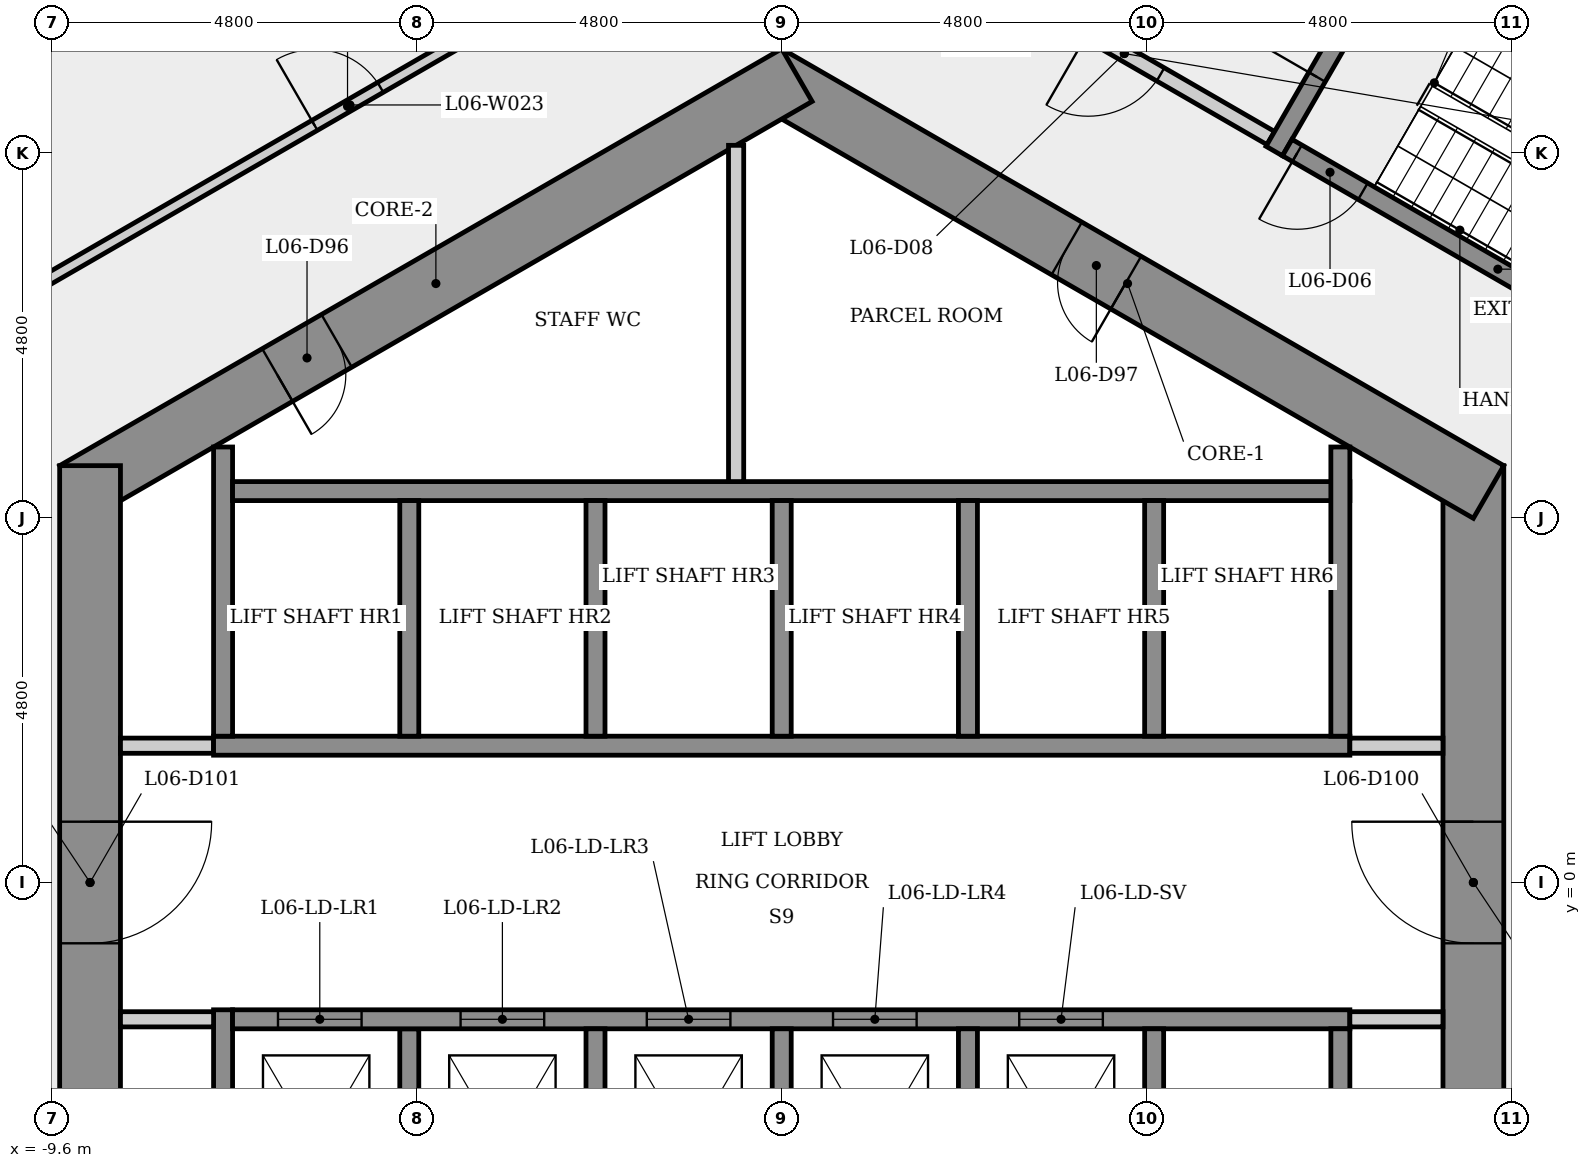
"""IFC4 building model, lengths in metres.
Left out: names, types, materials, properties, quantities, classifications, styles, units other than length and angle.
Written with IfcOpenShell. Run it as: python <this file> out.ifc"""

import sys

from ifc_helpers import new_model, si_unit, direction, frame, frame_2d, origin, place, context, subcontext, project, spatial, rectangle, extrude, element, fill, save


model = new_model("IFC4")
c1 = context("Model", 3, precision=1e-05, world=origin(), true_north=direction((0.0, 1.0)))
c2 = subcontext(c1, "Body", "Model", "MODEL_VIEW")
j1 = project(units=[si_unit("LENGTHUNIT", "METRE"), si_unit("PLANEANGLEUNIT", "RADIAN")], contexts=[c1])
p1 = place(None, origin())
s1 = spatial("IfcSite", under=j1, at=p1, CompositionType="ELEMENT")
p2 = place(p1, origin())
s2 = spatial("IfcBuilding", under=s1, at=p2, CompositionType="ELEMENT")
p3 = place(p2, frame((0.0, 0.0, 28.9)))
s3 = spatial("IfcBuildingStorey", under=s2, at=p3, CompositionType="ELEMENT", Elevation=28.9)
p4 = place(p3, frame((9.1, -5.485, 0.0), z_axis=(0.0, 0.0, 1.0), x_axis=(0.0, 1.0, 0.0)))
e1 = element("IfcWall", 1, at=p4, inside=s3, PredefinedType="SHEAR", context=c2, shape_type="SweptSolid", body=[
    extrude(rectangle(XDim=10.97, YDim=0.8, at=frame_2d((5.485, 0.0))), origin(), (0.0, 0.0, 1.0), 3.4),
])
p5 = place(p4, frame((4.685, 0.0, 0.0)))
e2 = element("IfcOpeningElement", 2, at=p5, cuts=e1, PredefinedType="OPENING", context=c2, shape_type="SweptSolid", body=[
    extrude(rectangle(XDim=1.6, YDim=2.1, at=frame_2d((0.8, 1.05))), frame((0.0, 0.41, 0.0), z_axis=(0.0, -1.0, 0.0), x_axis=(1.0, 0.0, 0.0)), (0.0, 0.0, 1.0), 0.82),
])
p6 = place(p3, frame((9.3, 5.138, 0.0), z_axis=(0.0, 0.0, 1.0), x_axis=(-0.866023993627, 0.500002442456, 0.0)))
e3 = element("IfcWall", 3, at=p6, inside=s3, PredefinedType="SHEAR", context=c2, shape_type="SweptSolid", body=[
    extrude(rectangle(XDim=10.97, YDim=0.8, at=frame_2d((5.485, 0.0))), origin(), (0.0, 0.0, 1.0), 3.4),
])
p7 = place(p6, frame((5.509, 0.0, 0.0)))
e4 = element("IfcOpeningElement", 4, at=p7, cuts=e3, PredefinedType="OPENING", context=c2, shape_type="SweptSolid", body=[
    extrude(rectangle(XDim=0.9, YDim=2.1, at=frame_2d((0.45, 1.05))), frame((0.0, 0.41, 0.0), z_axis=(0.0, -1.0, 0.0), x_axis=(1.0, 0.0, 0.0)), (0.0, 0.0, 1.0), 0.82),
])
p8 = place(p3, frame((0.2, 10.623, 0.0), z_axis=(0.0, 0.0, 1.0), x_axis=(-0.866023993627, -0.500002442456, 0.0)))
e5 = element("IfcWall", 5, at=p8, inside=s3, PredefinedType="SHEAR", context=c2, shape_type="SweptSolid", body=[
    extrude(rectangle(XDim=10.97, YDim=0.8, at=frame_2d((5.485, 0.0))), origin(), (0.0, 0.0, 1.0), 3.4),
])
p9 = place(p8, frame((6.993, 0.0, 0.0)))
e6 = element("IfcOpeningElement", 6, at=p9, cuts=e5, PredefinedType="OPENING", context=c2, shape_type="SweptSolid", body=[
    extrude(rectangle(XDim=0.9, YDim=2.1, at=frame_2d((0.45, 1.05))), frame((0.0, 0.41, 0.0), z_axis=(0.0, -1.0, 0.0), x_axis=(1.0, 0.0, 0.0)), (0.0, 0.0, 1.0), 0.82),
])
p10 = place(p3, frame((-9.1, 5.485, 0.0), z_axis=(0.0, 0.0, 1.0), x_axis=(0.0, -1.0, 0.0)))
e7 = element("IfcWall", 7, at=p10, inside=s3, PredefinedType="SHEAR", context=c2, shape_type="SweptSolid", body=[
    extrude(rectangle(XDim=10.97, YDim=0.8, at=frame_2d((5.485, 0.0))), origin(), (0.0, 0.0, 1.0), 3.4),
])
p11 = place(p10, frame((4.685, 0.0, 0.0)))
e8 = element("IfcOpeningElement", 8, at=p11, cuts=e7, PredefinedType="OPENING", context=c2, shape_type="SweptSolid", body=[
    extrude(rectangle(XDim=1.6, YDim=2.1, at=frame_2d((0.8, 1.05))), frame((0.0, 0.41, 0.0), z_axis=(0.0, -1.0, 0.0), x_axis=(1.0, 0.0, 0.0)), (0.0, 0.0, 1.0), 0.82),
])
p12 = place(p3, frame((-10.825, 7.26, 0.0), z_axis=(0.0, 0.0, 1.0), x_axis=(0.866026819738, 0.499997547488, 0.0)))
e9 = element("IfcWall", 9, at=p12, inside=s3, PredefinedType="PARTITIONING", context=c2, shape_type="SweptSolid", body=[
    extrude(rectangle(XDim=11.882, YDim=0.15, at=frame_2d((5.941, 0.0))), origin(), (0.0, 0.0, 1.0), 3.05),
])
p13 = place(p12, frame((5.403, 0.0, 0.0)))
e10 = element("IfcOpeningElement", 10, at=p13, cuts=e9, PredefinedType="OPENING", context=c2, shape_type="SweptSolid", body=[
    extrude(rectangle(XDim=1.0, YDim=2.1, at=frame_2d((0.5, 1.05))), frame((0.0, 0.085, 0.0), z_axis=(0.0, -1.0, 0.0), x_axis=(1.0, 0.0, 0.0)), (0.0, 0.0, 1.0), 0.17),
])
p14 = place(p3, frame((-8.7, 1.8, 0.0), z_axis=(0.0, 0.0, 1.0), x_axis=(1.0, 0.0, 0.0)))
e11 = element("IfcWall", 11, at=p14, inside=s3, PredefinedType="PARTITIONING", context=c2, shape_type="SweptSolid", body=[
    extrude(rectangle(XDim=1.225, YDim=0.2, at=frame_2d((0.613, 0.0))), origin(), (0.0, 0.0, 1.0), 3.05),
])
p15 = place(p3, frame((-7.475, 1.8, 0.0), z_axis=(0.0, 0.0, 1.0), x_axis=(1.0, 0.0, 0.0)))
e12 = element("IfcWall", 12, at=p15, inside=s3, PredefinedType="SHEAR", context=c2, shape_type="SweptSolid", body=[
    extrude(rectangle(XDim=14.95, YDim=0.25, at=frame_2d((7.475, 0.0))), origin(), (0.0, 0.0, 1.0), 3.05),
])
p16 = place(p3, frame((-7.35, -5.73, 0.0), z_axis=(0.0, 0.0, 1.0), x_axis=(0.0, 1.0, 0.0)))
e13 = element("IfcWall", 13, at=p16, inside=s3, PredefinedType="SHEAR", context=c2, shape_type="SweptSolid", body=[
    extrude(rectangle(XDim=4.055, YDim=0.25, at=frame_2d((2.028, 0.0))), origin(), (0.0, 0.0, 1.0), 3.05),
])
p17 = place(p3, frame((-7.35, 1.925, 0.0), z_axis=(0.0, 0.0, 1.0), x_axis=(0.0, 1.0, 0.0)))
e14 = element("IfcWall", 14, at=p17, inside=s3, PredefinedType="SHEAR", context=c2, shape_type="SweptSolid", body=[
    extrude(rectangle(XDim=3.805, YDim=0.25, at=frame_2d((1.903, 0.0))), origin(), (0.0, 0.0, 1.0), 3.05),
])
p18 = place(p3, frame((-7.225, 5.15, 0.0), z_axis=(0.0, 0.0, 1.0), x_axis=(1.0, 0.0, 0.0)))
e15 = element("IfcWall", 15, at=p18, inside=s3, PredefinedType="SHEAR", context=c2, shape_type="SweptSolid", body=[
    extrude(rectangle(XDim=14.7, YDim=0.25, at=frame_2d((7.35, 0.0))), origin(), (0.0, 0.0, 1.0), 3.05),
])
p19 = place(p3, frame((-7.475, -1.8, 0.0), z_axis=(0.0, 0.0, 1.0), x_axis=(-1.0, 0.0, 0.0)))
e16 = element("IfcWall", 16, at=p19, inside=s3, PredefinedType="PARTITIONING", context=c2, shape_type="SweptSolid", body=[
    extrude(rectangle(XDim=1.225, YDim=0.2, at=frame_2d((0.613, 0.0))), origin(), (0.0, 0.0, 1.0), 3.05),
])
for number, where, z_axis, x_axis in (
    (17, (-4.9, -1.925, 0.0), (0.0, 0.0, 1.0), (0.0, -1.0, 0.0)),
    (18, (-4.9, 5.025, 0.0), (0.0, 0.0, 1.0), (0.0, -1.0, 0.0)),
):
    element("IfcWall", number, at=place(p3, frame(where, z_axis=z_axis, x_axis=x_axis)), inside=s3, PredefinedType="SHEAR", context=c2, shape_type="SweptSolid", body=[
        extrude(rectangle(XDim=3.1, YDim=0.25, at=frame_2d((1.55, 0.0))), origin(), (0.0, 0.0, 1.0), 3.4),
    ])
p20 = place(p3, frame((-7.225, -1.8, 0.0), z_axis=(0.0, 0.0, 1.0), x_axis=(1.0, 0.0, 0.0)))
e19 = element("IfcWall", 19, at=p20, inside=s3, PredefinedType="SHEAR", context=c2, shape_type="SweptSolid", body=[
    extrude(rectangle(XDim=14.7, YDim=0.25, at=frame_2d((7.35, 0.0))), origin(), (0.0, 0.0, 1.0), 3.05),
])
p21 = place(p20, frame((0.597, 0.0, 0.0)))
e20 = element("IfcOpeningElement", 20, at=p21, cuts=e19, PredefinedType="OPENING", context=c2, shape_type="SweptSolid", body=[
    extrude(rectangle(XDim=1.1, YDim=2.1, at=frame_2d((0.55, 1.05))), frame((0.0, 0.135, 0.0), z_axis=(0.0, -1.0, 0.0), x_axis=(1.0, 0.0, 0.0)), (0.0, 0.0, 1.0), 0.27),
])
p22 = place(p20, frame((3.0, 0.0, 0.0)))
e21 = element("IfcOpeningElement", 21, at=p22, cuts=e19, PredefinedType="OPENING", context=c2, shape_type="SweptSolid", body=[
    extrude(rectangle(XDim=1.1, YDim=2.1, at=frame_2d((0.55, 1.05))), frame((0.0, 0.135, 0.0), z_axis=(0.0, -1.0, 0.0), x_axis=(1.0, 0.0, 0.0)), (0.0, 0.0, 1.0), 0.27),
])
p23 = place(p20, frame((5.45, 0.0, 0.0)))
e22 = element("IfcOpeningElement", 22, at=p23, cuts=e19, PredefinedType="OPENING", context=c2, shape_type="SweptSolid", body=[
    extrude(rectangle(XDim=1.1, YDim=2.1, at=frame_2d((0.55, 1.05))), frame((0.0, 0.135, 0.0), z_axis=(0.0, -1.0, 0.0), x_axis=(1.0, 0.0, 0.0)), (0.0, 0.0, 1.0), 0.27),
])
p24 = place(p20, frame((7.9, 0.0, 0.0)))
e23 = element("IfcOpeningElement", 23, at=p24, cuts=e19, PredefinedType="OPENING", context=c2, shape_type="SweptSolid", body=[
    extrude(rectangle(XDim=1.1, YDim=2.1, at=frame_2d((0.55, 1.05))), frame((0.0, 0.135, 0.0), z_axis=(0.0, -1.0, 0.0), x_axis=(1.0, 0.0, 0.0)), (0.0, 0.0, 1.0), 0.27),
])
p25 = place(p20, frame((10.35, 0.0, 0.0)))
e24 = element("IfcOpeningElement", 24, at=p25, cuts=e19, PredefinedType="OPENING", context=c2, shape_type="SweptSolid", body=[
    extrude(rectangle(XDim=1.1, YDim=2.1, at=frame_2d((0.55, 1.05))), frame((0.0, 0.135, 0.0), z_axis=(0.0, -1.0, 0.0), x_axis=(1.0, 0.0, 0.0)), (0.0, 0.0, 1.0), 0.27),
])
for number, where, z_axis, x_axis in (
    (25, (-2.45, -1.925, 0.0), (0.0, 0.0, 1.0), (0.0, -1.0, 0.0)),
    (26, (-2.45, 5.025, 0.0), (0.0, 0.0, 1.0), (0.0, -1.0, 0.0)),
):
    element("IfcWall", number, at=place(p3, frame(where, z_axis=z_axis, x_axis=x_axis)), inside=s3, PredefinedType="SHEAR", context=c2, shape_type="SweptSolid", body=[
        extrude(rectangle(XDim=3.1, YDim=0.25, at=frame_2d((1.55, 0.0))), origin(), (0.0, 0.0, 1.0), 3.4),
    ])
p26 = place(p3, frame((-0.6, 9.699, 0.0), z_axis=(0.0, 0.0, 1.0), x_axis=(0.0, -1.0, 0.0)))
e27 = element("IfcWall", 27, at=p26, inside=s3, PredefinedType="PARTITIONING", context=c2, shape_type="SweptSolid", body=[
    extrude(rectangle(XDim=4.425, YDim=0.2, at=frame_2d((2.212, 0.0))), origin(), (0.0, 0.0, 1.0), 3.05),
])
for number, where, z_axis, x_axis in (
    (28, (0.0, -1.925, 0.0), (0.0, 0.0, 1.0), (0.0, -1.0, 0.0)),
    (29, (0.0, 5.025, 0.0), (0.0, 0.0, 1.0), (0.0, -1.0, 0.0)),
    (30, (2.45, -1.925, 0.0), (0.0, 0.0, 1.0), (0.0, -1.0, 0.0)),
    (31, (2.45, 5.025, 0.0), (0.0, 0.0, 1.0), (0.0, -1.0, 0.0)),
    (32, (4.9, -1.925, 0.0), (0.0, 0.0, 1.0), (0.0, -1.0, 0.0)),
    (33, (4.9, 5.025, 0.0), (0.0, 0.0, 1.0), (0.0, -1.0, 0.0)),
):
    element("IfcWall", number, at=place(p3, frame(where, z_axis=z_axis, x_axis=x_axis)), inside=s3, PredefinedType="SHEAR", context=c2, shape_type="SweptSolid", body=[
        extrude(rectangle(XDim=3.1, YDim=0.25, at=frame_2d((1.55, 0.0))), origin(), (0.0, 0.0, 1.0), 3.4),
    ])
p27 = place(p3, frame((6.435, 9.795, 0.0), z_axis=(0.0, 0.0, 1.0), x_axis=(-0.866012907634, 0.500021643343, 0.0)))
e34 = element("IfcWall", 34, at=p27, inside=s3, PredefinedType="PARTITIONING", context=c2, shape_type="SweptSolid", body=[
    extrude(rectangle(XDim=4.45, YDim=0.2, at=frame_2d((2.225, 0.0))), origin(), (0.0, 0.0, 1.0), 3.05),
])
p28 = place(p27, frame((1.675, 0.0, 0.0)))
e35 = element("IfcOpeningElement", 35, at=p28, cuts=e34, PredefinedType="OPENING", context=c2, shape_type="SweptSolid", body=[
    extrude(rectangle(XDim=1.1, YDim=2.1, at=frame_2d((0.55, 1.05))), frame((0.0, 0.11, 0.0), z_axis=(0.0, -1.0, 0.0), x_axis=(1.0, 0.0, 0.0)), (0.0, 0.0, 1.0), 0.22),
])
p29 = place(p3, frame((6.48, 9.624, 0.0), z_axis=(0.0, 0.0, 1.0), x_axis=(0.500017246033, 0.866015446554, 0.0)))
e36 = element("IfcWall", 36, at=p29, inside=s3, PredefinedType="SHEAR", context=c2, shape_type="SweptSolid", body=[
    extrude(rectangle(XDim=3.25, YDim=0.25, at=frame_2d((1.625, 0.0))), origin(), (0.0, 0.0, 1.0), 3.05),
])
p30 = place(p29, frame((1.125, 0.0, 0.0)))
e37 = element("IfcOpeningElement", 37, at=p30, cuts=e36, PredefinedType="OPENING", context=c2, shape_type="SweptSolid", body=[
    extrude(rectangle(XDim=1.0, YDim=2.1, at=frame_2d((0.5, 1.05))), frame((0.0, 0.135, 0.0), z_axis=(0.0, -1.0, 0.0), x_axis=(1.0, 0.0, 0.0)), (0.0, 0.0, 1.0), 0.27),
])
p31 = place(p3, frame((7.475, 1.8, 0.0), z_axis=(0.0, 0.0, 1.0), x_axis=(1.0, 0.0, 0.0)))
e38 = element("IfcWall", 38, at=p31, inside=s3, PredefinedType="PARTITIONING", context=c2, shape_type="SweptSolid", body=[
    extrude(rectangle(XDim=1.225, YDim=0.2, at=frame_2d((0.613, 0.0))), origin(), (0.0, 0.0, 1.0), 3.05),
])
for number, where, z_axis, x_axis in (
    (39, (7.35, -1.925, 0.0), (0.0, 0.0, 1.0), (0.0, -1.0, 0.0)),
    (40, (7.35, 5.73, 0.0), (0.0, 0.0, 1.0), (0.0, -1.0, 0.0)),
):
    element("IfcWall", number, at=place(p3, frame(where, z_axis=z_axis, x_axis=x_axis)), inside=s3, PredefinedType="SHEAR", context=c2, shape_type="SweptSolid", body=[
        extrude(rectangle(XDim=3.805, YDim=0.25, at=frame_2d((1.903, 0.0))), origin(), (0.0, 0.0, 1.0), 3.05),
    ])
p32 = place(p3, frame((8.151, 12.268, 0.0), z_axis=(0.0, 0.0, 1.0), x_axis=(0.866025499775, -0.499999833739, 0.0)))
e41 = element("IfcWall", 41, at=p32, inside=s3, PredefinedType="SHEAR", context=c2, shape_type="SweptSolid", body=[
    extrude(rectangle(XDim=6.4, YDim=0.25, at=frame_2d((3.2, 0.0))), origin(), (0.0, 0.0, 1.0), 3.05),
])
p33 = place(p3, frame((8.7, -1.8, 0.0), z_axis=(0.0, 0.0, 1.0), x_axis=(-1.0, 0.0, 0.0)))
e42 = element("IfcWall", 42, at=p33, inside=s3, PredefinedType="PARTITIONING", context=c2, shape_type="SweptSolid", body=[
    extrude(rectangle(XDim=1.225, YDim=0.2, at=frame_2d((0.613, 0.0))), origin(), (0.0, 0.0, 1.0), 3.05),
])
p34 = place(p3, frame((12.194, 6.47, 0.0), z_axis=(0.0, 0.0, 1.0), x_axis=(-0.866025499775, 0.499999833739, 0.0)))
e43 = element("IfcWall", 43, at=p34, inside=s3, PredefinedType="SHEAR", context=c2, shape_type="SweptSolid", body=[
    extrude(rectangle(XDim=6.4, YDim=0.25, at=frame_2d((3.2, 0.0))), origin(), (0.0, 0.0, 1.0), 3.05),
])
p35 = place(p34, frame((5.25, 0.0, 0.0)))
e44 = element("IfcOpeningElement", 44, at=p35, cuts=e43, PredefinedType="OPENING", context=c2, shape_type="SweptSolid", body=[
    extrude(rectangle(XDim=1.0, YDim=2.1, at=frame_2d((0.5, 1.05))), frame((0.0, 0.135, 0.0), z_axis=(0.0, -1.0, 0.0), x_axis=(1.0, 0.0, 0.0)), (0.0, 0.0, 1.0), 0.27),
])
p36 = place(p21, origin())
e45 = element("IfcDoor", 45, at=p36, inside=s3, OperationType="SLIDING_TO_LEFT", PredefinedType="DOOR", context=c2, shape_type="SweptSolid", body=[
    extrude(rectangle(XDim=1.1, YDim=2.1, at=frame_2d((0.55, 1.05))), frame((0.0, 0.025, 0.0), z_axis=(0.0, -1.0, 0.0), x_axis=(1.0, 0.0, 0.0)), (0.0, 0.0, 1.0), 0.05),
])
fill(e20, e45)
p37 = place(p22, origin())
e46 = element("IfcDoor", 46, at=p37, inside=s3, OperationType="SLIDING_TO_LEFT", PredefinedType="DOOR", context=c2, shape_type="SweptSolid", body=[
    extrude(rectangle(XDim=1.1, YDim=2.1, at=frame_2d((0.55, 1.05))), frame((0.0, 0.025, 0.0), z_axis=(0.0, -1.0, 0.0), x_axis=(1.0, 0.0, 0.0)), (0.0, 0.0, 1.0), 0.05),
])
fill(e21, e46)
p38 = place(p23, origin())
e47 = element("IfcDoor", 47, at=p38, inside=s3, OperationType="SLIDING_TO_LEFT", PredefinedType="DOOR", context=c2, shape_type="SweptSolid", body=[
    extrude(rectangle(XDim=1.1, YDim=2.1, at=frame_2d((0.55, 1.05))), frame((0.0, 0.025, 0.0), z_axis=(0.0, -1.0, 0.0), x_axis=(1.0, 0.0, 0.0)), (0.0, 0.0, 1.0), 0.05),
])
fill(e22, e47)
p39 = place(p24, origin())
e48 = element("IfcDoor", 48, at=p39, inside=s3, OperationType="SLIDING_TO_LEFT", PredefinedType="DOOR", context=c2, shape_type="SweptSolid", body=[
    extrude(rectangle(XDim=1.1, YDim=2.1, at=frame_2d((0.55, 1.05))), frame((0.0, 0.025, 0.0), z_axis=(0.0, -1.0, 0.0), x_axis=(1.0, 0.0, 0.0)), (0.0, 0.0, 1.0), 0.05),
])
fill(e23, e48)
p40 = place(p25, origin())
e49 = element("IfcDoor", 49, at=p40, inside=s3, OperationType="SLIDING_TO_LEFT", PredefinedType="DOOR", context=c2, shape_type="SweptSolid", body=[
    extrude(rectangle(XDim=1.1, YDim=2.1, at=frame_2d((0.55, 1.05))), frame((0.0, 0.025, 0.0), z_axis=(0.0, -1.0, 0.0), x_axis=(1.0, 0.0, 0.0)), (0.0, 0.0, 1.0), 0.05),
])
fill(e24, e49)
p41 = place(p35, origin())
e50 = element("IfcDoor", 50, at=p41, inside=s3, OperationType="SINGLE_SWING_RIGHT", PredefinedType="DOOR", context=c2, shape_type="SweptSolid", body=[
    extrude(rectangle(XDim=1.0, YDim=2.1, at=frame_2d((0.5, 1.05))), frame((0.0, 0.025, 0.0), z_axis=(0.0, -1.0, 0.0), x_axis=(1.0, 0.0, 0.0)), (0.0, 0.0, 1.0), 0.05),
])
fill(e44, e50)
p42 = place(p30, origin())
e51 = element("IfcDoor", 51, at=p42, inside=s3, OperationType="SINGLE_SWING_LEFT", PredefinedType="DOOR", context=c2, shape_type="SweptSolid", body=[
    extrude(rectangle(XDim=1.0, YDim=2.1, at=frame_2d((0.5, 1.05))), frame((0.0, 0.025, 0.0), z_axis=(0.0, -1.0, 0.0), x_axis=(1.0, 0.0, 0.0)), (0.0, 0.0, 1.0), 0.05),
])
fill(e37, e51)
p43 = place(p28, origin())
e52 = element("IfcDoor", 52, at=p43, inside=s3, OperationType="SINGLE_SWING_RIGHT", PredefinedType="DOOR", context=c2, shape_type="SweptSolid", body=[
    extrude(rectangle(XDim=1.1, YDim=2.1, at=frame_2d((0.55, 1.05))), frame((0.0, 0.025, 0.0), z_axis=(0.0, -1.0, 0.0), x_axis=(1.0, 0.0, 0.0)), (0.0, 0.0, 1.0), 0.05),
])
fill(e35, e52)
p44 = place(p13, origin())
e53 = element("IfcDoor", 53, at=p44, inside=s3, OperationType="SINGLE_SWING_LEFT", PredefinedType="DOOR", context=c2, shape_type="SweptSolid", body=[
    extrude(rectangle(XDim=1.0, YDim=2.1, at=frame_2d((0.5, 1.05))), frame((0.0, 0.025, 0.0), z_axis=(0.0, -1.0, 0.0), x_axis=(1.0, 0.0, 0.0)), (0.0, 0.0, 1.0), 0.05),
])
fill(e10, e53)
p45 = place(p9, origin())
e54 = element("IfcDoor", 54, at=p45, inside=s3, OperationType="SINGLE_SWING_RIGHT", PredefinedType="DOOR", context=c2, shape_type="SweptSolid", body=[
    extrude(rectangle(XDim=0.9, YDim=2.1, at=frame_2d((0.45, 1.05))), frame((0.0, 0.025, 0.0), z_axis=(0.0, -1.0, 0.0), x_axis=(1.0, 0.0, 0.0)), (0.0, 0.0, 1.0), 0.05),
])
fill(e6, e54)
p46 = place(p7, origin())
e55 = element("IfcDoor", 55, at=p46, inside=s3, OperationType="SINGLE_SWING_LEFT", PredefinedType="DOOR", context=c2, shape_type="SweptSolid", body=[
    extrude(rectangle(XDim=0.9, YDim=2.1, at=frame_2d((0.45, 1.05))), frame((0.0, 0.025, 0.0), z_axis=(0.0, -1.0, 0.0), x_axis=(1.0, 0.0, 0.0)), (0.0, 0.0, 1.0), 0.05),
])
fill(e4, e55)
p47 = place(p5, origin())
e56 = element("IfcDoor", 56, at=p47, inside=s3, OperationType="SINGLE_SWING_RIGHT", PredefinedType="DOOR", context=c2, shape_type="SweptSolid", body=[
    extrude(rectangle(XDim=1.6, YDim=2.1, at=frame_2d((0.8, 1.05))), frame((0.0, 0.025, 0.0), z_axis=(0.0, -1.0, 0.0), x_axis=(1.0, 0.0, 0.0)), (0.0, 0.0, 1.0), 0.05),
])
fill(e2, e56)
p48 = place(p11, origin())
e57 = element("IfcDoor", 57, at=p48, inside=s3, OperationType="SINGLE_SWING_LEFT", PredefinedType="DOOR", context=c2, shape_type="SweptSolid", body=[
    extrude(rectangle(XDim=1.6, YDim=2.1, at=frame_2d((0.8, 1.05))), frame((0.0, 0.025, 0.0), z_axis=(0.0, -1.0, 0.0), x_axis=(1.0, 0.0, 0.0)), (0.0, 0.0, 1.0), 0.05),
])
fill(e8, e57)
save(model, sys.argv[1])
